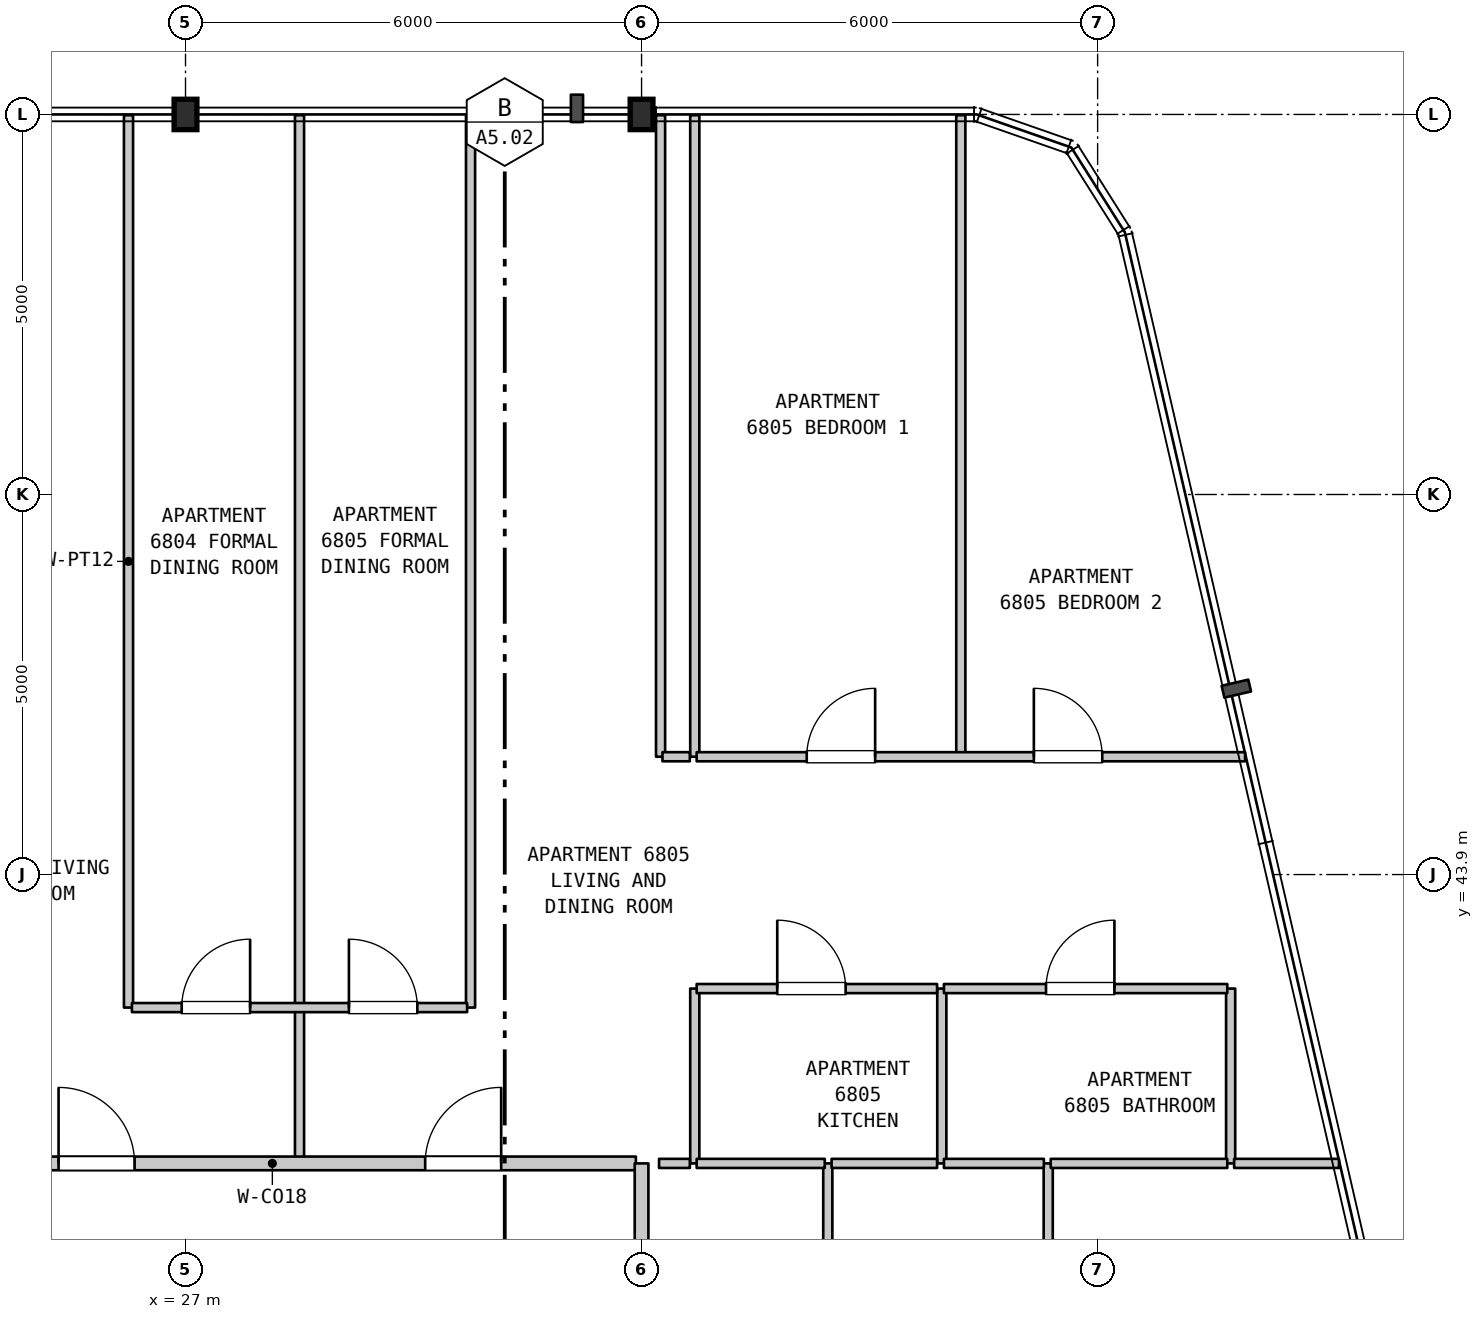
"""IFC4 building model, lengths in metres.
Left out: names, types, materials, properties, quantities, classifications, styles, units other than length and angle.
Written with IfcOpenShell. Run it as: python <this file> out.ifc"""

import sys

from ifc_helpers import new_model, si_unit, direction, frame, frame_2d, origin, origin_2d, place, context, subcontext, project, spatial, rectangle, i_section, extrude, element, fill, save


model = new_model("IFC4")
c1 = context("Model", 3, precision=1e-05, world=origin(), true_north=direction((0.0, 1.0)))
c2 = subcontext(c1, "Body", "Model", "MODEL_VIEW")
j1 = project(units=[si_unit("LENGTHUNIT", "METRE"), si_unit("PLANEANGLEUNIT", "RADIAN")], contexts=[c1])
p1 = place(None, origin())
s1 = spatial("IfcSite", under=j1, at=p1, CompositionType="ELEMENT")
p2 = place(p1, origin())
s2 = spatial("IfcBuilding", under=s1, at=p2, CompositionType="ELEMENT")
p3 = place(p2, frame((0.0, 0.0, 273.2)))
s3 = spatial("IfcBuildingStorey", under=s2, at=p3, CompositionType="ELEMENT", Elevation=273.2)
for number, where, z_axis, x_axis in (
    (1, (27.0, 53.9, 0.0), (0.0, 0.0, 1.0), (1.0, 0.0, 0.0)),
    (2, (33.0, 53.9, 0.0), (0.0, 0.0, 1.0), (1.0, 0.0, 0.0)),
):
    element("IfcColumn", number, at=place(p3, frame(where, z_axis=z_axis, x_axis=x_axis)), inside=s3, PredefinedType="COLUMN", context=c2, shape_type="SweptSolid", body=[
        extrude(i_section(OverallWidth=0.3, OverallDepth=0.4, WebThickness=0.013, FlangeThickness=0.024, FilletRadius=0.027, at=origin_2d()), origin(), (0.0, 0.0, 1.0), 3.7),
    ])
p4 = place(p3, frame((26.25, 42.15, 0.0), z_axis=(0.0, 0.0, 1.0), x_axis=(0.0, 1.0, 0.0)))
e3 = element("IfcWall", 3, at=p4, inside=s3, PredefinedType="PARTITIONING", context=c2, shape_type="SweptSolid", body=[
    extrude(rectangle(XDim=11.74, YDim=0.12, at=frame_2d((5.87, 0.0))), origin(), (0.0, 0.0, 1.0), 3.39),
])
p5 = place(p3, frame((28.5, 40.1, 0.0), z_axis=(0.0, 0.0, 1.0), x_axis=(0.0, 1.0, 0.0)))
e4 = element("IfcWall", 4, at=p5, inside=s3, PredefinedType="PARTITIONING", context=c2, shape_type="SweptSolid", body=[
    extrude(rectangle(XDim=2.05, YDim=0.12, at=frame_2d((1.025, 0.0))), origin(), (0.0, 0.0, 1.0), 3.39),
])
for number, where, z_axis, x_axis in (
    (5, (28.5, 42.15, 0.0), (0.0, 0.0, 1.0), (0.0, 1.0, 0.0)),
    (6, (30.75, 42.15, 0.0), (0.0, 0.0, 1.0), (0.0, 1.0, 0.0)),
):
    element("IfcWall", number, at=place(p3, frame(where, z_axis=z_axis, x_axis=x_axis)), inside=s3, PredefinedType="PARTITIONING", context=c2, shape_type="SweptSolid", body=[
        extrude(rectangle(XDim=11.74, YDim=0.12, at=frame_2d((5.87, 0.0))), origin(), (0.0, 0.0, 1.0), 3.39),
    ])
p6 = place(p3, frame((33.25, 45.45, 0.0), z_axis=(0.0, 0.0, 1.0), x_axis=(0.0, 1.0, 0.0)))
e7 = element("IfcWall", 7, at=p6, inside=s3, PredefinedType="PARTITIONING", context=c2, shape_type="SweptSolid", body=[
    extrude(rectangle(XDim=8.44, YDim=0.12, at=frame_2d((4.22, 0.0))), origin(), (0.0, 0.0, 1.0), 3.39),
])
p7 = place(p3, frame((33.7, 40.1, 0.0), z_axis=(0.0, 0.0, 1.0), x_axis=(0.0, 1.0, 0.0)))
e8 = element("IfcWall", 8, at=p7, inside=s3, PredefinedType="PARTITIONING", context=c2, shape_type="SweptSolid", body=[
    extrude(rectangle(XDim=2.3, YDim=0.12, at=frame_2d((1.15, 0.0))), origin(), (0.0, 0.0, 1.0), 3.39),
])
p8 = place(p3, frame((33.7, 45.45, 0.0), z_axis=(0.0, 0.0, 1.0), x_axis=(0.0, 1.0, 0.0)))
e9 = element("IfcWall", 9, at=p8, inside=s3, PredefinedType="PARTITIONING", context=c2, shape_type="SweptSolid", body=[
    extrude(rectangle(XDim=8.44, YDim=0.12, at=frame_2d((4.22, 0.0))), origin(), (0.0, 0.0, 1.0), 3.39),
])
p9 = place(p3, frame((35.45, 33.75, 0.0), z_axis=(0.0, 0.0, 1.0), x_axis=(0.0, 1.0, 0.0)))
e10 = element("IfcWall", 10, at=p9, inside=s3, PredefinedType="PARTITIONING", context=c2, shape_type="SweptSolid", body=[
    extrude(rectangle(XDim=6.35, YDim=0.12, at=frame_2d((3.175, 0.0))), origin(), (0.0, 0.0, 1.0), 3.39),
])
p10 = place(p3, frame((36.95, 40.1, 0.0), z_axis=(0.0, 0.0, 1.0), x_axis=(0.0, 1.0, 0.0)))
e11 = element("IfcWall", 11, at=p10, inside=s3, PredefinedType="PARTITIONING", context=c2, shape_type="SweptSolid", body=[
    extrude(rectangle(XDim=2.3, YDim=0.12, at=frame_2d((1.15, 0.0))), origin(), (0.0, 0.0, 1.0), 3.39),
])
p11 = place(p3, frame((37.2, 45.45, 0.0), z_axis=(0.0, 0.0, 1.0), x_axis=(0.0, 1.0, 0.0)))
e12 = element("IfcWall", 12, at=p11, inside=s3, PredefinedType="PARTITIONING", context=c2, shape_type="SweptSolid", body=[
    extrude(rectangle(XDim=8.44, YDim=0.12, at=frame_2d((4.22, 0.0))), origin(), (0.0, 0.0, 1.0), 3.39),
])
p12 = place(p3, frame((38.35, 33.75, 0.0), z_axis=(0.0, 0.0, 1.0), x_axis=(0.0, 1.0, 0.0)))
e13 = element("IfcWall", 13, at=p12, inside=s3, PredefinedType="PARTITIONING", context=c2, shape_type="SweptSolid", body=[
    extrude(rectangle(XDim=6.35, YDim=0.12, at=frame_2d((3.175, 0.0))), origin(), (0.0, 0.0, 1.0), 3.39),
])
p13 = place(p3, frame((40.75, 40.1, 0.0), z_axis=(0.0, 0.0, 1.0), x_axis=(0.0, 1.0, 0.0)))
e14 = element("IfcWall", 14, at=p13, inside=s3, PredefinedType="PARTITIONING", context=c2, shape_type="SweptSolid", body=[
    extrude(rectangle(XDim=2.3, YDim=0.12, at=frame_2d((1.15, 0.0))), origin(), (0.0, 0.0, 1.0), 3.39),
])
p14 = place(p3, frame((23.36, 40.1, 0.0), z_axis=(0.0, 0.0, 1.0), x_axis=(1.0, 0.0, 0.0)))
e15 = element("IfcWall", 15, at=p14, inside=s3, PredefinedType="STANDARD", context=c2, shape_type="SweptSolid", body=[
    extrude(rectangle(XDim=9.565, YDim=0.18, at=frame_2d((4.782, 0.0))), origin(), (0.0, 0.0, 1.0), 3.39),
])
p15 = place(p14, frame((1.97, 0.0, 0.0)))
e16 = element("IfcOpeningElement", 16, at=p15, cuts=e15, PredefinedType="OPENING", context=c2, shape_type="SweptSolid", body=[
    extrude(rectangle(XDim=1.0, YDim=2.15, at=frame_2d((0.5, 1.075))), frame((0.0, 0.1, 0.0), z_axis=(0.0, -1.0, 0.0), x_axis=(1.0, 0.0, 0.0)), (0.0, 0.0, 1.0), 0.2),
])
p16 = place(p14, frame((6.793, 0.0, 0.0)))
e17 = element("IfcOpeningElement", 17, at=p16, cuts=e15, PredefinedType="OPENING", context=c2, shape_type="SweptSolid", body=[
    extrude(rectangle(XDim=1.0, YDim=2.15, at=frame_2d((0.5, 1.075))), frame((0.0, 0.1, 0.0), z_axis=(0.0, -1.0, 0.0), x_axis=(1.0, 0.0, 0.0)), (0.0, 0.0, 1.0), 0.2),
])
p17 = place(p3, frame((33.23, 40.1, 0.0), z_axis=(0.0, 0.0, 1.0), x_axis=(1.0, 0.0, 0.0)))
e18 = element("IfcWall", 18, at=p17, inside=s3, PredefinedType="PARTITIONING", context=c2, shape_type="SweptSolid", body=[
    extrude(rectangle(XDim=0.405, YDim=0.12, at=frame_2d((0.203, 0.0))), origin(), (0.0, 0.0, 1.0), 3.39),
])
p18 = place(p3, frame((33.725, 40.1, 0.0), z_axis=(0.0, 0.0, 1.0), x_axis=(1.0, 0.0, 0.0)))
e19 = element("IfcWall", 19, at=p18, inside=s3, PredefinedType="PARTITIONING", context=c2, shape_type="SweptSolid", body=[
    extrude(rectangle(XDim=1.685, YDim=0.12, at=frame_2d((0.842, 0.0))), origin(), (0.0, 0.0, 1.0), 3.39),
])
p19 = place(p3, frame((35.5, 40.1, 0.0), z_axis=(0.0, 0.0, 1.0), x_axis=(1.0, 0.0, 0.0)))
e20 = element("IfcWall", 20, at=p19, inside=s3, PredefinedType="PARTITIONING", context=c2, shape_type="SweptSolid", body=[
    extrude(rectangle(XDim=1.388, YDim=0.12, at=frame_2d((0.694, 0.0))), origin(), (0.0, 0.0, 1.0), 3.39),
])
p20 = place(p3, frame((36.978, 40.1, 0.0), z_axis=(0.0, 0.0, 1.0), x_axis=(1.0, 0.0, 0.0)))
e21 = element("IfcWall", 21, at=p20, inside=s3, PredefinedType="PARTITIONING", context=c2, shape_type="SweptSolid", body=[
    extrude(rectangle(XDim=1.315, YDim=0.12, at=frame_2d((0.657, 0.0))), origin(), (0.0, 0.0, 1.0), 3.39),
])
p21 = place(p3, frame((38.383, 40.1, 0.0), z_axis=(0.0, 0.0, 1.0), x_axis=(1.0, 0.0, 0.0)))
e22 = element("IfcWall", 22, at=p21, inside=s3, PredefinedType="PARTITIONING", context=c2, shape_type="SweptSolid", body=[
    extrude(rectangle(XDim=2.323, YDim=0.12, at=frame_2d((1.162, 0.0))), origin(), (0.0, 0.0, 1.0), 3.39),
])
p22 = place(p3, frame((40.796, 40.1, 0.0), z_axis=(0.0, 0.0, 1.0), x_axis=(1.0, 0.0, 0.0)))
e23 = element("IfcWall", 23, at=p22, inside=s3, PredefinedType="PARTITIONING", context=c2, shape_type="SweptSolid", body=[
    extrude(rectangle(XDim=1.379, YDim=0.12, at=frame_2d((0.689, 0.0))), origin(), (0.0, 0.0, 1.0), 3.39),
])
p23 = place(p3, frame((26.295, 42.15, 0.0), z_axis=(0.0, 0.0, 1.0), x_axis=(1.0, 0.0, 0.0)))
e24 = element("IfcWall", 24, at=p23, inside=s3, PredefinedType="PARTITIONING", context=c2, shape_type="SweptSolid", body=[
    extrude(rectangle(XDim=4.41, YDim=0.12, at=frame_2d((2.205, 0.0))), origin(), (0.0, 0.0, 1.0), 3.39),
])
p24 = place(p23, frame((0.655, 0.0, 0.0)))
e25 = element("IfcOpeningElement", 25, at=p24, cuts=e24, PredefinedType="OPENING", context=c2, shape_type="SweptSolid", body=[
    extrude(rectangle(XDim=0.9, YDim=2.15, at=frame_2d((0.45, 1.075))), frame((0.0, 0.07, 0.0), z_axis=(0.0, -1.0, 0.0), x_axis=(1.0, 0.0, 0.0)), (0.0, 0.0, 1.0), 0.14),
])
p25 = place(p23, frame((2.855, 0.0, 0.0)))
e26 = element("IfcOpeningElement", 26, at=p25, cuts=e24, PredefinedType="OPENING", context=c2, shape_type="SweptSolid", body=[
    extrude(rectangle(XDim=0.9, YDim=2.15, at=frame_2d((0.45, 1.075))), frame((0.0, 0.07, 0.0), z_axis=(0.0, -1.0, 0.0), x_axis=(1.0, 0.0, 0.0)), (0.0, 0.0, 1.0), 0.14),
])
p26 = place(p3, frame((33.725, 42.4, 0.0), z_axis=(0.0, 0.0, 1.0), x_axis=(1.0, 0.0, 0.0)))
e27 = element("IfcWall", 27, at=p26, inside=s3, PredefinedType="PARTITIONING", context=c2, shape_type="SweptSolid", body=[
    extrude(rectangle(XDim=3.163, YDim=0.12, at=frame_2d((1.582, 0.0))), origin(), (0.0, 0.0, 1.0), 3.39),
])
p27 = place(p26, frame((1.06, 0.0, 0.0)))
e28 = element("IfcOpeningElement", 28, at=p27, cuts=e27, PredefinedType="OPENING", context=c2, shape_type="SweptSolid", body=[
    extrude(rectangle(XDim=0.9, YDim=2.15, at=frame_2d((0.45, 1.075))), frame((0.0, 0.07, 0.0), z_axis=(0.0, -1.0, 0.0), x_axis=(1.0, 0.0, 0.0)), (0.0, 0.0, 1.0), 0.14),
])
p28 = place(p3, frame((36.978, 42.4, 0.0), z_axis=(0.0, 0.0, 1.0), x_axis=(1.0, 0.0, 0.0)))
e29 = element("IfcWall", 29, at=p28, inside=s3, PredefinedType="PARTITIONING", context=c2, shape_type="SweptSolid", body=[
    extrude(rectangle(XDim=3.728, YDim=0.12, at=frame_2d((1.864, 0.0))), origin(), (0.0, 0.0, 1.0), 3.39),
])
p29 = place(p28, frame((1.343, 0.0, 0.0)))
e30 = element("IfcOpeningElement", 30, at=p29, cuts=e29, PredefinedType="OPENING", context=c2, shape_type="SweptSolid", body=[
    extrude(rectangle(XDim=0.9, YDim=2.1, at=frame_2d((0.45, 1.05))), frame((0.0, 0.07, 0.0), z_axis=(0.0, -1.0, 0.0), x_axis=(1.0, 0.0, 0.0)), (0.0, 0.0, 1.0), 0.14),
])
p30 = place(p3, frame((33.275, 45.45, 0.0), z_axis=(0.0, 0.0, 1.0), x_axis=(1.0, 0.0, 0.0)))
e31 = element("IfcWall", 31, at=p30, inside=s3, PredefinedType="PARTITIONING", context=c2, shape_type="SweptSolid", body=[
    extrude(rectangle(XDim=0.36, YDim=0.12, at=frame_2d((0.18, 0.0))), origin(), (0.0, 0.0, 1.0), 3.39),
])
p31 = place(p3, frame((33.725, 45.45, 0.0), z_axis=(0.0, 0.0, 1.0), x_axis=(1.0, 0.0, 0.0)))
e32 = element("IfcWall", 32, at=p31, inside=s3, PredefinedType="PARTITIONING", context=c2, shape_type="SweptSolid", body=[
    extrude(rectangle(XDim=7.215, YDim=0.12, at=frame_2d((3.607, 0.0))), origin(), (0.0, 0.0, 1.0), 3.39),
])
p32 = place(p31, frame((1.448, 0.0, 0.0)))
e33 = element("IfcOpeningElement", 33, at=p32, cuts=e32, PredefinedType="OPENING", context=c2, shape_type="SweptSolid", body=[
    extrude(rectangle(XDim=0.9, YDim=2.15, at=frame_2d((0.45, 1.075))), frame((0.0, 0.07, 0.0), z_axis=(0.0, -1.0, 0.0), x_axis=(1.0, 0.0, 0.0)), (0.0, 0.0, 1.0), 0.14),
])
p33 = place(p31, frame((4.436, 0.0, 0.0)))
e34 = element("IfcOpeningElement", 34, at=p33, cuts=e32, PredefinedType="OPENING", context=c2, shape_type="SweptSolid", body=[
    extrude(rectangle(XDim=0.9, YDim=2.15, at=frame_2d((0.45, 1.075))), frame((0.0, 0.07, 0.0), z_axis=(0.0, -1.0, 0.0), x_axis=(1.0, 0.0, 0.0)), (0.0, 0.0, 1.0), 0.14),
])
p34 = place(p3, frame((33.0, 37.9, 0.0), z_axis=(0.0, 0.0, 1.0), x_axis=(0.0, 1.0, 0.0)))
e35 = element("IfcWall", 35, at=p34, inside=s3, PredefinedType="STANDARD", context=c2, shape_type="SweptSolid", body=[
    extrude(rectangle(XDim=2.2, YDim=0.18, at=frame_2d((1.1, 0.0))), origin(), (0.0, 0.0, 1.0), 2.79),
])
p35 = place(p15, origin())
e36 = element("IfcDoor", 36, at=p35, inside=s3, OperationType="SINGLE_SWING_LEFT", PredefinedType="DOOR", context=c2, shape_type="SweptSolid", body=[
    extrude(rectangle(XDim=1.0, YDim=2.15, at=frame_2d((0.5, 1.075))), frame((0.0, 0.025, 0.0), z_axis=(0.0, -1.0, 0.0), x_axis=(1.0, 0.0, 0.0)), (0.0, 0.0, 1.0), 0.05),
])
fill(e16, e36)
p36 = place(p16, origin())
e37 = element("IfcDoor", 37, at=p36, inside=s3, OperationType="SINGLE_SWING_RIGHT", PredefinedType="DOOR", context=c2, shape_type="SweptSolid", body=[
    extrude(rectangle(XDim=1.0, YDim=2.15, at=frame_2d((0.5, 1.075))), frame((0.0, 0.025, 0.0), z_axis=(0.0, -1.0, 0.0), x_axis=(1.0, 0.0, 0.0)), (0.0, 0.0, 1.0), 0.05),
])
fill(e17, e37)
p37 = place(p24, origin())
e38 = element("IfcDoor", 38, at=p37, inside=s3, OperationType="SINGLE_SWING_RIGHT", PredefinedType="DOOR", context=c2, shape_type="SweptSolid", body=[
    extrude(rectangle(XDim=0.9, YDim=2.15, at=frame_2d((0.45, 1.075))), frame((0.0, 0.025, 0.0), z_axis=(0.0, -1.0, 0.0), x_axis=(1.0, 0.0, 0.0)), (0.0, 0.0, 1.0), 0.05),
])
fill(e25, e38)
p38 = place(p25, origin())
e39 = element("IfcDoor", 39, at=p38, inside=s3, OperationType="SINGLE_SWING_LEFT", PredefinedType="DOOR", context=c2, shape_type="SweptSolid", body=[
    extrude(rectangle(XDim=0.9, YDim=2.15, at=frame_2d((0.45, 1.075))), frame((0.0, 0.025, 0.0), z_axis=(0.0, -1.0, 0.0), x_axis=(1.0, 0.0, 0.0)), (0.0, 0.0, 1.0), 0.05),
])
fill(e26, e39)
p39 = place(p27, origin())
e40 = element("IfcDoor", 40, at=p39, inside=s3, OperationType="SINGLE_SWING_LEFT", PredefinedType="DOOR", context=c2, shape_type="SweptSolid", body=[
    extrude(rectangle(XDim=0.9, YDim=2.15, at=frame_2d((0.45, 1.075))), frame((0.0, 0.025, 0.0), z_axis=(0.0, -1.0, 0.0), x_axis=(1.0, 0.0, 0.0)), (0.0, 0.0, 1.0), 0.05),
])
fill(e28, e40)
p40 = place(p29, origin())
e41 = element("IfcDoor", 41, at=p40, inside=s3, OperationType="SINGLE_SWING_RIGHT", PredefinedType="DOOR", context=c2, shape_type="SweptSolid", body=[
    extrude(rectangle(XDim=0.9, YDim=2.1, at=frame_2d((0.45, 1.05))), frame((0.0, 0.025, 0.0), z_axis=(0.0, -1.0, 0.0), x_axis=(1.0, 0.0, 0.0)), (0.0, 0.0, 1.0), 0.05),
])
fill(e30, e41)
p41 = place(p32, origin())
e42 = element("IfcDoor", 42, at=p41, inside=s3, OperationType="SINGLE_SWING_RIGHT", PredefinedType="DOOR", context=c2, shape_type="SweptSolid", body=[
    extrude(rectangle(XDim=0.9, YDim=2.15, at=frame_2d((0.45, 1.075))), frame((0.0, 0.025, 0.0), z_axis=(0.0, -1.0, 0.0), x_axis=(1.0, 0.0, 0.0)), (0.0, 0.0, 1.0), 0.05),
])
fill(e33, e42)
p42 = place(p33, origin())
e43 = element("IfcDoor", 43, at=p42, inside=s3, OperationType="SINGLE_SWING_LEFT", PredefinedType="DOOR", context=c2, shape_type="SweptSolid", body=[
    extrude(rectangle(XDim=0.9, YDim=2.15, at=frame_2d((0.45, 1.075))), frame((0.0, 0.025, 0.0), z_axis=(0.0, -1.0, 0.0), x_axis=(1.0, 0.0, 0.0)), (0.0, 0.0, 1.0), 0.05),
])
fill(e34, e43)
save(model, sys.argv[1])
